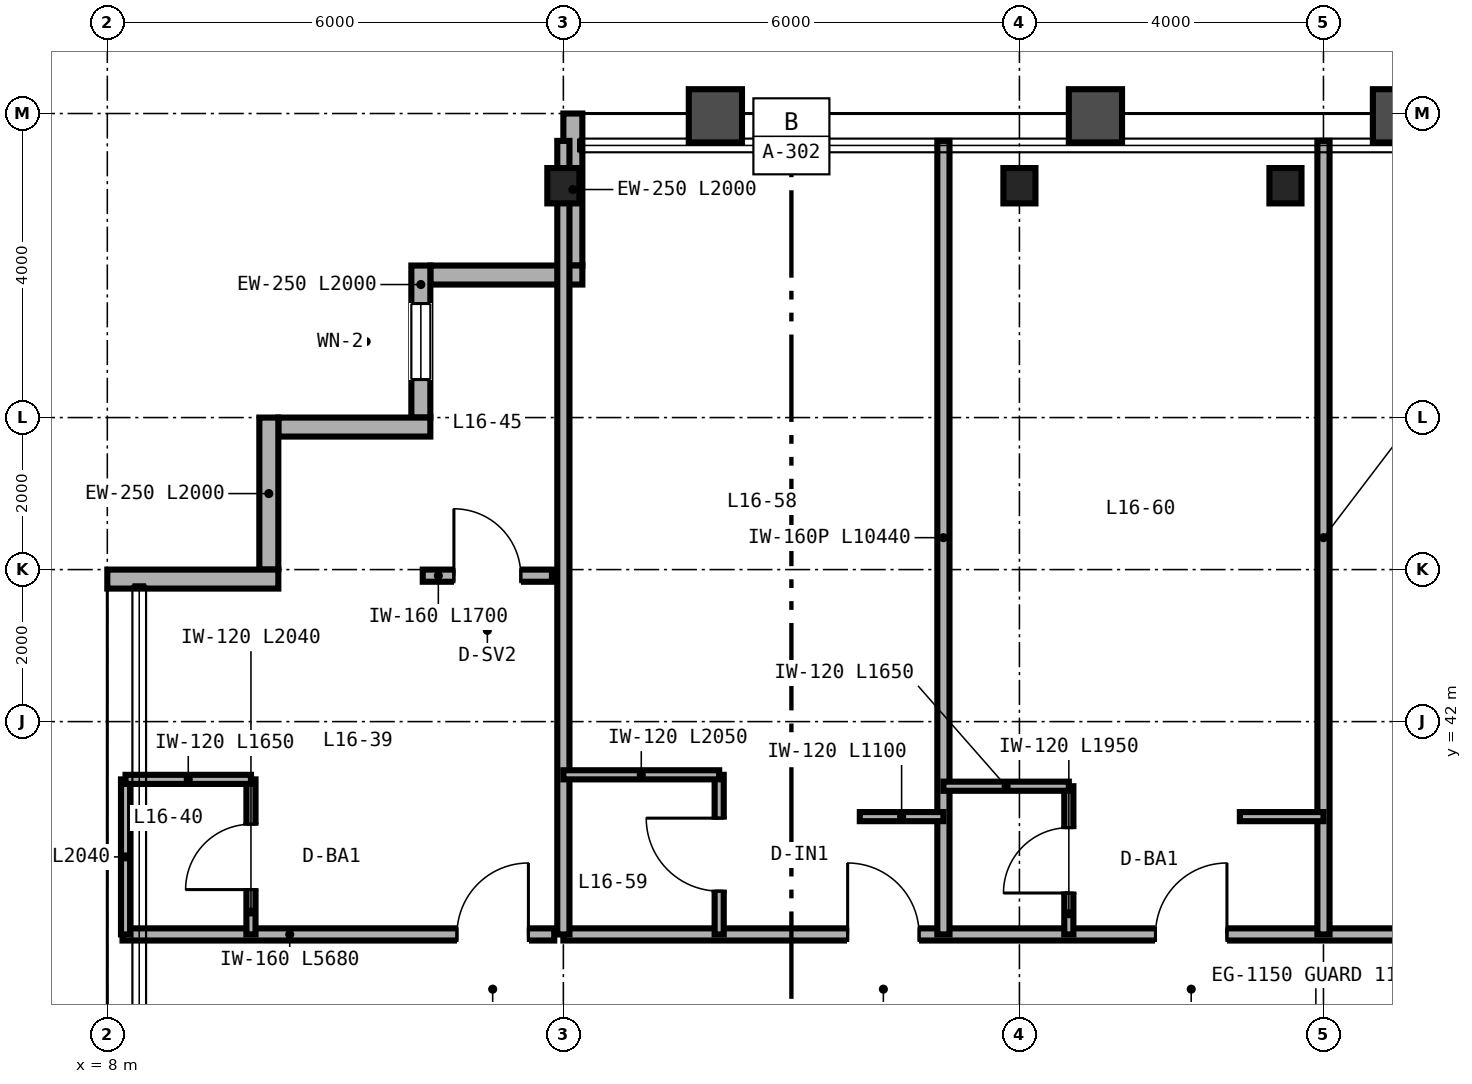
"""IFC4 building model, lengths in metres.
Left out: names, types, materials, properties, quantities, classifications, styles, units other than length and angle.
Written with IfcOpenShell. Run it as: python <this file> out.ifc"""

import sys

from ifc_helpers import new_model, si_unit, direction, frame, frame_2d, origin, origin_2d, place, context, subcontext, project, spatial, rectangle, i_section, extrude, source, transform, mapped, element, fill, save


model = new_model("IFC4")
c1 = context("Model", 3, precision=1e-05, world=origin(), true_north=direction((0.0, 1.0)))
c2 = subcontext(c1, "Body", "Model", "MODEL_VIEW")
j1 = project(units=[si_unit("LENGTHUNIT", "METRE"), si_unit("PLANEANGLEUNIT", "RADIAN")], contexts=[c1])
p1 = place(None, origin())
s1 = spatial("IfcSite", under=j1, at=p1, CompositionType="ELEMENT")
p2 = place(p1, origin())
s2 = spatial("IfcBuilding", under=s1, at=p2, CompositionType="ELEMENT")
p3 = place(p2, frame((0.0, 0.0, 67.2)))
s3 = spatial("IfcBuildingStorey", under=s2, at=p3, CompositionType="ELEMENT", Elevation=67.2)
m1 = source(origin(), c2, "Body", "SweptSolid", [
    extrude(i_section(OverallWidth=0.422, OverallDepth=0.465, WebThickness=0.045, FlangeThickness=0.073, FilletRadius=0.025, at=origin_2d()), origin(), (0.0, 0.0, 1.0), 3.35),
])
for number, where, z_axis, x_axis in (
    (1, (14.0, 49.05, 0.0), (0.0, 0.0, 1.0), (1.0, 0.0, 0.0)),
    (2, (20.0, 49.05, 0.0), (0.0, 0.0, 1.0), (1.0, 0.0, 0.0)),
    (3, (23.5, 49.05, 0.0), (0.0, 0.0, 1.0), (1.0, 0.0, 0.0)),
):
    element("IfcColumn", number, at=place(p3, frame(where, z_axis=z_axis, x_axis=x_axis)), inside=s3, PredefinedType="COLUMN", context=c2, shape_type="MappedRepresentation", body=[
        mapped(m1, transform((0.0, 0.0, 0.0), scale=1.0)),
    ])
p4 = place(p3, frame((14.125, 50.0, 0.0), z_axis=(0.0, 0.0, 1.0), x_axis=(0.0, -1.0, 0.0)))
e4 = element("IfcWall", 4, at=p4, inside=s3, PredefinedType="SOLIDWALL", context=c2, shape_type="SweptSolid", body=[
    extrude(rectangle(XDim=2.0, YDim=0.25, at=frame_2d((1.0, 0.0))), origin(), (0.0, 0.0, 1.0), 2.657),
])
p5 = place(p3, frame((14.25, 47.875, 0.0), z_axis=(0.0, 0.0, 1.0), x_axis=(-1.0, 0.0, 0.0)))
e5 = element("IfcWall", 5, at=p5, inside=s3, PredefinedType="SOLIDWALL", context=c2, shape_type="SweptSolid", body=[
    extrude(rectangle(XDim=2.0, YDim=0.25, at=frame_2d((1.0, 0.0))), origin(), (0.0, 0.0, 1.0), 3.35),
])
p6 = place(p3, frame((12.125, 48.0, 0.0), z_axis=(0.0, 0.0, 1.0), x_axis=(0.0, -1.0, 0.0)))
e6 = element("IfcWall", 6, at=p6, inside=s3, PredefinedType="SOLIDWALL", context=c2, shape_type="SweptSolid", body=[
    extrude(rectangle(XDim=2.0, YDim=0.25, at=frame_2d((1.0, 0.0))), origin(), (0.0, 0.0, 1.0), 3.35),
])
p7 = place(p6, frame((0.5, 0.0, 0.85)))
e7 = element("IfcOpeningElement", 7, at=p7, cuts=e6, PredefinedType="OPENING", context=c2, shape_type="SweptSolid", body=[
    extrude(rectangle(XDim=1.0, YDim=1.9, at=frame_2d((0.5, 0.95))), frame((0.0, 0.135, 0.0), z_axis=(0.0, -1.0, 0.0), x_axis=(1.0, 0.0, 0.0)), (0.0, 0.0, 1.0), 0.27),
])
for number, where, z_axis, x_axis in (
    (8, (12.25, 45.875, 0.0), (0.0, 0.0, 1.0), (-1.0, 0.0, 0.0)),
    (9, (10.125, 46.0, 0.0), (0.0, 0.0, 1.0), (0.0, -1.0, 0.0)),
):
    element("IfcWall", number, at=place(p3, frame(where, z_axis=z_axis, x_axis=x_axis)), inside=s3, PredefinedType="SOLIDWALL", context=c2, shape_type="SweptSolid", body=[
        extrude(rectangle(XDim=2.0, YDim=0.25, at=frame_2d((1.0, 0.0))), origin(), (0.0, 0.0, 1.0), 3.35),
    ])
p8 = place(p3, frame((10.25, 43.875, 0.0), z_axis=(0.0, 0.0, 1.0), x_axis=(-1.0, 0.0, 0.0)))
e10 = element("IfcWall", 10, at=p8, inside=s3, PredefinedType="SOLIDWALL", context=c2, shape_type="SweptSolid", body=[
    extrude(rectangle(XDim=2.25, YDim=0.25, at=frame_2d((1.125, 0.0))), origin(), (0.0, 0.0, 1.0), 3.35),
])
p9 = place(p3, frame((8.2, 39.2, 0.0), z_axis=(0.0, 0.0, 1.0), x_axis=(1.0, 0.0, 0.0)))
e11 = element("IfcWall", 11, at=p9, inside=s3, PredefinedType="PARTITIONING", context=c2, shape_type="SweptSolid", body=[
    extrude(rectangle(XDim=5.68, YDim=0.16, at=frame_2d((2.84, 0.0))), origin(), (0.0, 0.0, 1.0), 3.35),
])
p10 = place(p9, frame((4.4, 0.0, 0.0)))
e12 = element("IfcOpeningElement", 12, at=p10, cuts=e11, PredefinedType="OPENING", context=c2, shape_type="SweptSolid", body=[
    extrude(rectangle(XDim=0.94, YDim=2.15, at=frame_2d((0.47, 1.075))), frame((0.0, 0.09, 0.0), z_axis=(0.0, -1.0, 0.0), x_axis=(1.0, 0.0, 0.0)), (0.0, 0.0, 1.0), 0.18),
])
p11 = place(p3, frame((9.89, 39.2, 0.0), z_axis=(0.0, 0.0, 1.0), x_axis=(0.0, 1.0, 0.0)))
e13 = element("IfcWall", 13, at=p11, inside=s3, PredefinedType="PARTITIONING", context=c2, shape_type="SweptSolid", body=[
    extrude(rectangle(XDim=2.04, YDim=0.12, at=frame_2d((1.02, 0.0))), origin(), (0.0, 0.0, 1.0), 3.35),
])
p12 = place(p11, frame((0.59, 0.0, 0.0)))
e14 = element("IfcOpeningElement", 14, at=p12, cuts=e13, PredefinedType="OPENING", context=c2, shape_type="SweptSolid", body=[
    extrude(rectangle(XDim=0.86, YDim=2.1, at=frame_2d((0.43, 1.05))), frame((0.0, 0.07, 0.0), z_axis=(0.0, -1.0, 0.0), x_axis=(1.0, 0.0, 0.0)), (0.0, 0.0, 1.0), 0.14),
])
p13 = place(p3, frame((8.24, 39.2, 0.0), z_axis=(0.0, 0.0, 1.0), x_axis=(0.0, 1.0, 0.0)))
e15 = element("IfcWall", 15, at=p13, inside=s3, PredefinedType="PARTITIONING", context=c2, shape_type="SweptSolid", body=[
    extrude(rectangle(XDim=2.04, YDim=0.12, at=frame_2d((1.02, 0.0))), origin(), (0.0, 0.0, 1.0), 3.35),
])
p14 = place(p3, frame((8.24, 41.24, 0.0), z_axis=(0.0, 0.0, 1.0), x_axis=(1.0, 0.0, 0.0)))
e16 = element("IfcWall", 16, at=p14, inside=s3, PredefinedType="PARTITIONING", context=c2, shape_type="SweptSolid", body=[
    extrude(rectangle(XDim=1.65, YDim=0.12, at=frame_2d((0.825, 0.0))), origin(), (0.0, 0.0, 1.0), 3.35),
])
p15 = place(p3, frame((12.15, 43.92, 0.0), z_axis=(0.0, 0.0, 1.0), x_axis=(1.0, 0.0, 0.0)))
e17 = element("IfcWall", 17, at=p15, inside=s3, PredefinedType="PARTITIONING", context=c2, shape_type="SweptSolid", body=[
    extrude(rectangle(XDim=1.7, YDim=0.16, at=frame_2d((0.85, 0.0))), origin(), (0.0, 0.0, 1.0), 3.35),
])
p16 = place(p15, frame((0.41, 0.0, 0.0)))
e18 = element("IfcOpeningElement", 18, at=p16, cuts=e17, PredefinedType="OPENING", context=c2, shape_type="SweptSolid", body=[
    extrude(rectangle(XDim=0.88, YDim=2.15, at=frame_2d((0.44, 1.075))), frame((0.0, 0.09, 0.0), z_axis=(0.0, -1.0, 0.0), x_axis=(1.0, 0.0, 0.0)), (0.0, 0.0, 1.0), 0.18),
])
p17 = place(p3, frame((14.0, 39.2, 0.0), z_axis=(0.0, 0.0, 1.0), x_axis=(1.0, 0.0, 0.0)))
e19 = element("IfcWall", 19, at=p17, inside=s3, PredefinedType="PARTITIONING", context=c2, shape_type="SweptSolid", body=[
    extrude(rectangle(XDim=36.0, YDim=0.16, at=frame_2d((18.0, 0.0))), origin(), (0.0, 0.0, 1.0), 2.571),
])
p18 = place(p17, frame((3.74, 0.0, 0.0)))
e20 = element("IfcOpeningElement", 20, at=p18, cuts=e19, PredefinedType="OPENING", context=c2, shape_type="SweptSolid", body=[
    extrude(rectangle(XDim=0.94, YDim=2.15, at=frame_2d((0.47, 1.075))), frame((0.0, 0.09, 0.0), z_axis=(0.0, -1.0, 0.0), x_axis=(1.0, 0.0, 0.0)), (0.0, 0.0, 1.0), 0.18),
])
p19 = place(p17, frame((7.79, 0.0, 0.0)))
e21 = element("IfcOpeningElement", 21, at=p19, cuts=e19, PredefinedType="OPENING", context=c2, shape_type="SweptSolid", body=[
    extrude(rectangle(XDim=0.94, YDim=2.15, at=frame_2d((0.47, 1.075))), frame((0.0, 0.09, 0.0), z_axis=(0.0, -1.0, 0.0), x_axis=(1.0, 0.0, 0.0)), (0.0, 0.0, 1.0), 0.18),
])
p20 = place(p17, frame((12.22, 0.0, 0.0)))
e22 = element("IfcOpeningElement", 22, at=p20, cuts=e19, PredefinedType="OPENING", context=c2, shape_type="SweptSolid", body=[
    extrude(rectangle(XDim=0.96, YDim=2.15, at=frame_2d((0.48, 1.075))), frame((0.0, 0.09, 0.0), z_axis=(0.0, -1.0, 0.0), x_axis=(1.0, 0.0, 0.0)), (0.0, 0.0, 1.0), 0.18),
])
p21 = place(p17, frame((19.94, 0.0, 0.0)))
e23 = element("IfcOpeningElement", 23, at=p21, cuts=e19, PredefinedType="OPENING", context=c2, shape_type="SweptSolid", body=[
    extrude(rectangle(XDim=0.94, YDim=2.15, at=frame_2d((0.47, 1.075))), frame((0.0, 0.09, 0.0), z_axis=(0.0, -1.0, 0.0), x_axis=(1.0, 0.0, 0.0)), (0.0, 0.0, 1.0), 0.18),
])
p22 = place(p17, frame((24.84, 0.0, 0.0)))
e24 = element("IfcOpeningElement", 24, at=p22, cuts=e19, PredefinedType="OPENING", context=c2, shape_type="SweptSolid", body=[
    extrude(rectangle(XDim=0.94, YDim=2.15, at=frame_2d((0.47, 1.075))), frame((0.0, 0.09, 0.0), z_axis=(0.0, -1.0, 0.0), x_axis=(1.0, 0.0, 0.0)), (0.0, 0.0, 1.0), 0.18),
])
p23 = place(p17, frame((29.94, 0.0, 0.0)))
e25 = element("IfcOpeningElement", 25, at=p23, cuts=e19, PredefinedType="OPENING", context=c2, shape_type="SweptSolid", body=[
    extrude(rectangle(XDim=0.94, YDim=2.15, at=frame_2d((0.47, 1.075))), frame((0.0, 0.09, 0.0), z_axis=(0.0, -1.0, 0.0), x_axis=(1.0, 0.0, 0.0)), (0.0, 0.0, 1.0), 0.18),
])
p24 = place(p17, frame((33.12, 0.0, 0.0)))
e26 = element("IfcOpeningElement", 26, at=p24, cuts=e19, PredefinedType="OPENING", context=c2, shape_type="SweptSolid", body=[
    extrude(rectangle(XDim=0.96, YDim=2.15, at=frame_2d((0.48, 1.075))), frame((0.0, 0.09, 0.0), z_axis=(0.0, -1.0, 0.0), x_axis=(1.0, 0.0, 0.0)), (0.0, 0.0, 1.0), 0.18),
])
for number, where, z_axis, x_axis in (
    (27, (14.0, 39.2, 0.0), (0.0, 0.0, 1.0), (0.0, 1.0, 0.0)),
    (28, (19.0, 39.2, 0.0), (0.0, 0.0, 1.0), (0.0, 1.0, 0.0)),
):
    element("IfcWall", number, at=place(p3, frame(where, z_axis=z_axis, x_axis=x_axis)), inside=s3, PredefinedType="PARTITIONING", context=c2, shape_type="SweptSolid", body=[
        extrude(rectangle(XDim=10.44, YDim=0.16, at=frame_2d((5.22, 0.0))), origin(), (0.0, 0.0, 1.0), 2.657),
    ])
p25 = place(p3, frame((16.05, 39.2, 0.0), z_axis=(0.0, 0.0, 1.0), x_axis=(0.0, 1.0, 0.0)))
e29 = element("IfcWall", 29, at=p25, inside=s3, PredefinedType="PARTITIONING", context=c2, shape_type="SweptSolid", body=[
    extrude(rectangle(XDim=2.1, YDim=0.12, at=frame_2d((1.05, 0.0))), origin(), (0.0, 0.0, 1.0), 3.35),
])
p26 = place(p25, frame((0.57, 0.0, 0.0)))
e30 = element("IfcOpeningElement", 30, at=p26, cuts=e29, PredefinedType="OPENING", context=c2, shape_type="SweptSolid", body=[
    extrude(rectangle(XDim=0.96, YDim=2.15, at=frame_2d((0.48, 1.075))), frame((0.0, 0.07, 0.0), z_axis=(0.0, -1.0, 0.0), x_axis=(1.0, 0.0, 0.0)), (0.0, 0.0, 1.0), 0.14),
])
p27 = place(p3, frame((14.0, 41.3, 0.0), z_axis=(0.0, 0.0, 1.0), x_axis=(1.0, 0.0, 0.0)))
e31 = element("IfcWall", 31, at=p27, inside=s3, PredefinedType="PARTITIONING", context=c2, shape_type="SweptSolid", body=[
    extrude(rectangle(XDim=2.05, YDim=0.12, at=frame_2d((1.025, 0.0))), origin(), (0.0, 0.0, 1.0), 3.35),
])
p28 = place(p3, frame((17.9, 40.75, 0.0), z_axis=(0.0, 0.0, 1.0), x_axis=(1.0, 0.0, 0.0)))
e32 = element("IfcWall", 32, at=p28, inside=s3, PredefinedType="PARTITIONING", context=c2, shape_type="SweptSolid", body=[
    extrude(rectangle(XDim=1.1, YDim=0.12, at=frame_2d((0.55, 0.0))), origin(), (0.0, 0.0, 1.0), 3.35),
])
p29 = place(p3, frame((24.0, 39.2, 0.0), z_axis=(0.0, 0.0, 1.0), x_axis=(0.0, 1.0, 0.0)))
e33 = element("IfcWall", 33, at=p29, inside=s3, PredefinedType="PARTITIONING", context=c2, shape_type="SweptSolid", body=[
    extrude(rectangle(XDim=10.44, YDim=0.16, at=frame_2d((5.22, 0.0))), origin(), (0.0, 0.0, 1.0), 2.423),
])
p30 = place(p3, frame((20.65, 39.2, 0.0), z_axis=(0.0, 0.0, 1.0), x_axis=(0.0, 1.0, 0.0)))
e34 = element("IfcWall", 34, at=p30, inside=s3, PredefinedType="PARTITIONING", context=c2, shape_type="SweptSolid", body=[
    extrude(rectangle(XDim=1.95, YDim=0.12, at=frame_2d((0.975, 0.0))), origin(), (0.0, 0.0, 1.0), 3.35),
])
p31 = place(p30, frame((0.545, 0.0, 0.0)))
e35 = element("IfcOpeningElement", 35, at=p31, cuts=e34, PredefinedType="OPENING", context=c2, shape_type="SweptSolid", body=[
    extrude(rectangle(XDim=0.86, YDim=2.1, at=frame_2d((0.43, 1.05))), frame((0.0, 0.07, 0.0), z_axis=(0.0, -1.0, 0.0), x_axis=(1.0, 0.0, 0.0)), (0.0, 0.0, 1.0), 0.14),
])
p32 = place(p3, frame((19.0, 41.15, 0.0), z_axis=(0.0, 0.0, 1.0), x_axis=(1.0, 0.0, 0.0)))
e36 = element("IfcWall", 36, at=p32, inside=s3, PredefinedType="PARTITIONING", context=c2, shape_type="SweptSolid", body=[
    extrude(rectangle(XDim=1.65, YDim=0.12, at=frame_2d((0.825, 0.0))), origin(), (0.0, 0.0, 1.0), 3.35),
])
p33 = place(p3, frame((22.9, 40.75, 0.0), z_axis=(0.0, 0.0, 1.0), x_axis=(1.0, 0.0, 0.0)))
e37 = element("IfcWall", 37, at=p33, inside=s3, PredefinedType="PARTITIONING", context=c2, shape_type="SweptSolid", body=[
    extrude(rectangle(XDim=1.1, YDim=0.12, at=frame_2d((0.55, 0.0))), origin(), (0.0, 0.0, 1.0), 2.571),
])
m2 = source(origin(), c2, "Body", "SweptSolid", [
    extrude(rectangle(XDim=1.0, YDim=1.9, at=frame_2d((0.5, 0.95))), frame((0.0, 0.03, 0.0), z_axis=(0.0, -1.0, 0.0), x_axis=(1.0, 0.0, 0.0)), (0.0, 0.0, 1.0), 0.06),
])
p34 = place(p7, origin())
e38 = element("IfcWindow", 38, at=p34, inside=s3, PartitioningType="SINGLE_PANEL", PredefinedType="WINDOW", context=c2, shape_type="MappedRepresentation", body=[
    mapped(m2, transform((0.0, 0.0, 0.0), scale=1.0)),
])
fill(e7, e38)
m3 = source(origin(), c2, "Body", "SweptSolid", [
    extrude(rectangle(XDim=0.86, YDim=2.1, at=frame_2d((0.43, 1.05))), frame((0.0, 0.025, 0.0), z_axis=(0.0, -1.0, 0.0), x_axis=(1.0, 0.0, 0.0)), (0.0, 0.0, 1.0), 0.05),
])
p35 = place(p12, origin())
e39 = element("IfcDoor", 39, at=p35, inside=s3, OperationType="SINGLE_SWING_LEFT", PredefinedType="DOOR", context=c2, shape_type="MappedRepresentation", body=[
    mapped(m3, transform((0.0, 0.0, 0.0), scale=1.0)),
])
fill(e14, e39)
m4 = source(origin(), c2, "Body", "SweptSolid", [
    extrude(rectangle(XDim=0.94, YDim=2.15, at=frame_2d((0.47, 1.075))), frame((0.0, 0.025, 0.0), z_axis=(0.0, -1.0, 0.0), x_axis=(1.0, 0.0, 0.0)), (0.0, 0.0, 1.0), 0.05),
])
p36 = place(p10, origin())
e40 = element("IfcDoor", 40, at=p36, inside=s3, OperationType="SINGLE_SWING_RIGHT", PredefinedType="DOOR", context=c2, shape_type="MappedRepresentation", body=[
    mapped(m4, transform((0.0, 0.0, 0.0), scale=1.0)),
])
fill(e12, e40)
m5 = source(origin(), c2, "Body", "SweptSolid", [
    extrude(rectangle(XDim=0.88, YDim=2.15, at=frame_2d((0.44, 1.075))), frame((0.0, 0.025, 0.0), z_axis=(0.0, -1.0, 0.0), x_axis=(1.0, 0.0, 0.0)), (0.0, 0.0, 1.0), 0.05),
])
p37 = place(p16, origin())
e41 = element("IfcDoor", 41, at=p37, inside=s3, OperationType="SINGLE_SWING_LEFT", PredefinedType="DOOR", context=c2, shape_type="MappedRepresentation", body=[
    mapped(m5, transform((0.0, 0.0, 0.0), scale=1.0)),
])
fill(e18, e41)
m6 = source(origin(), c2, "Body", "SweptSolid", [
    extrude(rectangle(XDim=0.96, YDim=2.15, at=frame_2d((0.48, 1.075))), frame((0.0, 0.025, 0.0), z_axis=(0.0, -1.0, 0.0), x_axis=(1.0, 0.0, 0.0)), (0.0, 0.0, 1.0), 0.05),
])
p38 = place(p26, origin())
e42 = element("IfcDoor", 42, at=p38, inside=s3, OperationType="SINGLE_SWING_RIGHT", PredefinedType="DOOR", context=c2, shape_type="MappedRepresentation", body=[
    mapped(m6, transform((0.0, 0.0, 0.0), scale=1.0)),
])
fill(e30, e42)
p39 = place(p31, origin())
e43 = element("IfcDoor", 43, at=p39, inside=s3, OperationType="SINGLE_SWING_LEFT", PredefinedType="DOOR", context=c2, shape_type="MappedRepresentation", body=[
    mapped(m3, transform((0.0, 0.0, 0.0), scale=1.0)),
])
fill(e35, e43)
p40 = place(p18, origin())
e44 = element("IfcDoor", 44, at=p40, inside=s3, OperationType="SINGLE_SWING_LEFT", PredefinedType="DOOR", context=c2, shape_type="MappedRepresentation", body=[
    mapped(m4, transform((0.0, 0.0, 0.0), scale=1.0)),
])
fill(e20, e44)
p41 = place(p19, origin())
e45 = element("IfcDoor", 45, at=p41, inside=s3, OperationType="SINGLE_SWING_RIGHT", PredefinedType="DOOR", context=c2, shape_type="MappedRepresentation", body=[
    mapped(m4, transform((0.0, 0.0, 0.0), scale=1.0)),
])
fill(e21, e45)
save(model, sys.argv[1])
